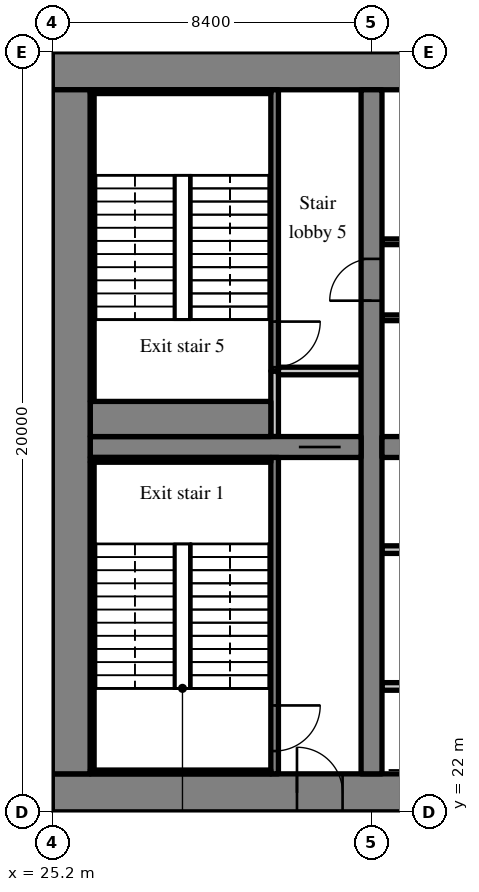
"""IFC4 building model, lengths in metres.
Left out: names, types, materials, properties, quantities, classifications, styles, units other than length and angle.
Written with IfcOpenShell. Run it as: python <this file> out.ifc"""

import sys

from ifc_helpers import new_model, si_unit, direction, frame, frame_2d, origin, place, context, subcontext, project, spatial, rectangle, extrude, source, transform, mapped, element, fill, save


model = new_model("IFC4")
c1 = context("Model", 3, precision=1e-05, world=origin(), true_north=direction((0.0, 1.0)))
c2 = subcontext(c1, "Body", "Model", "MODEL_VIEW")
j1 = project(units=[si_unit("LENGTHUNIT", "METRE"), si_unit("PLANEANGLEUNIT", "RADIAN")], contexts=[c1])
p1 = place(None, origin())
s1 = spatial("IfcSite", under=j1, at=p1, CompositionType="ELEMENT")
p2 = place(p1, origin())
s2 = spatial("IfcBuilding", under=s1, at=p2, CompositionType="ELEMENT")
p3 = place(p2, frame((0.0, 0.0, 65.8)))
s3 = spatial("IfcBuildingStorey", under=s2, at=p3, CompositionType="ELEMENT", Elevation=65.8)
m1 = source(origin(), c2, "Body", "SweptSolid", [
    extrude(rectangle(XDim=50.4, YDim=1.0, at=frame_2d((25.2, 0.0))), origin(), (0.0, 0.0, 1.0), 3.52),
])
p4 = place(p3, frame((25.2, 22.5, 0.0), z_axis=(0.0, 0.0, 1.0), x_axis=(1.0, 0.0, 0.0)))
e1 = element("IfcWall", 1, at=p4, inside=s3, PredefinedType="SHEAR", context=c2, shape_type="MappedRepresentation", body=[
    mapped(m1, transform((0.0, 0.0, 0.0), scale=1.0)),
])
m2 = source(origin(), c2, "Body", "SweptSolid", [
    extrude(rectangle(XDim=1.8, YDim=2.1, at=frame_2d((0.9, 1.05))), frame((0.0, 0.51, 0.0), z_axis=(0.0, -1.0, 0.0), x_axis=(1.0, 0.0, 0.0)), (0.0, 0.0, 1.0), 1.02),
])
p5 = place(p4, frame((15.9, 0.0, 0.0)))
e2 = element("IfcOpeningElement", 2, at=p5, cuts=e1, PredefinedType="OPENING", context=c2, shape_type="MappedRepresentation", body=[
    mapped(m2, transform((0.0, 0.0, 0.0), scale=1.0)),
])
m3 = source(origin(), c2, "Body", "SweptSolid", [
    extrude(rectangle(XDim=1.2, YDim=2.1, at=frame_2d((0.6, 1.05))), frame((0.0, 0.51, 0.0), z_axis=(0.0, -1.0, 0.0), x_axis=(1.0, 0.0, 0.0)), (0.0, 0.0, 1.0), 1.02),
])
p6 = place(p4, frame((26.987, 0.0, 0.0)))
e3 = element("IfcOpeningElement", 3, at=p6, cuts=e1, PredefinedType="OPENING", context=c2, shape_type="MappedRepresentation", body=[
    mapped(m3, transform((0.0, 0.0, 0.0), scale=1.0)),
])
m4 = source(origin(), c2, "Body", "SweptSolid", [
    extrude(rectangle(XDim=0.9, YDim=2.1, at=frame_2d((0.45, 1.05))), frame((0.0, 0.51, 0.0), z_axis=(0.0, -1.0, 0.0), x_axis=(1.0, 0.0, 0.0)), (0.0, 0.0, 1.0), 1.02),
])
p7 = place(p4, frame((34.5, 0.0, 0.0)))
e4 = element("IfcOpeningElement", 4, at=p7, cuts=e1, PredefinedType="OPENING", context=c2, shape_type="MappedRepresentation", body=[
    mapped(m4, transform((0.0, 0.0, 0.0), scale=1.0)),
])
p8 = place(p4, frame((31.5, 0.0, 0.0)))
e5 = element("IfcOpeningElement", 5, at=p8, cuts=e1, PredefinedType="OPENING", context=c2, shape_type="MappedRepresentation", body=[
    mapped(m4, transform((0.0, 0.0, 0.0), scale=1.0)),
])
p9 = place(p4, frame((39.769, 0.0, 0.0)))
e6 = element("IfcOpeningElement", 6, at=p9, cuts=e1, PredefinedType="OPENING", context=c2, shape_type="MappedRepresentation", body=[
    mapped(m4, transform((0.0, 0.0, 0.0), scale=1.0)),
])
p10 = place(p4, frame((36.756, 0.0, 0.0)))
e7 = element("IfcOpeningElement", 7, at=p10, cuts=e1, PredefinedType="OPENING", context=c2, shape_type="MappedRepresentation", body=[
    mapped(m4, transform((0.0, 0.0, 0.0), scale=1.0)),
])
p11 = place(p4, frame((6.438, 0.0, 0.0)))
e8 = element("IfcOpeningElement", 8, at=p11, cuts=e1, PredefinedType="OPENING", context=c2, shape_type="MappedRepresentation", body=[
    mapped(m3, transform((0.0, 0.0, 0.0), scale=1.0)),
])
p12 = place(p4, frame((47.725, 0.0, 0.0)))
e9 = element("IfcOpeningElement", 9, at=p12, cuts=e1, PredefinedType="OPENING", context=c2, shape_type="MappedRepresentation", body=[
    mapped(m3, transform((0.0, 0.0, 0.0), scale=1.0)),
])
p13 = place(p3, frame((25.2, 41.5, 0.0), z_axis=(0.0, 0.0, 1.0), x_axis=(1.0, 0.0, 0.0)))
e10 = element("IfcWall", 10, at=p13, inside=s3, PredefinedType="SHEAR", context=c2, shape_type="MappedRepresentation", body=[
    mapped(m1, transform((0.0, 0.0, 0.0), scale=1.0)),
])
m5 = source(origin(), c2, "Body", "SweptSolid", [
    extrude(rectangle(XDim=18.0, YDim=1.0, at=frame_2d((9.0, 0.0))), origin(), (0.0, 0.0, 1.0), 3.52),
])
p14 = place(p3, frame((25.7, 23.0, 0.0), z_axis=(0.0, 0.0, 1.0), x_axis=(0.0, 1.0, 0.0)))
e11 = element("IfcWall", 11, at=p14, inside=s3, PredefinedType="SHEAR", context=c2, shape_type="MappedRepresentation", body=[
    mapped(m5, transform((0.0, 0.0, 0.0), scale=1.0)),
])
m6 = source(origin(), c2, "Body", "SweptSolid", [
    extrude(rectangle(XDim=18.0, YDim=0.55, at=frame_2d((9.0, 0.0))), origin(), (0.0, 0.0, 1.0), 3.52),
])
p15 = place(p3, frame((33.6, 23.0, 0.0), z_axis=(0.0, 0.0, 1.0), x_axis=(0.0, 1.0, 0.0)))
e12 = element("IfcWall", 12, at=p15, inside=s3, PredefinedType="SHEAR", context=c2, shape_type="MappedRepresentation", body=[
    mapped(m6, transform((0.0, 0.0, 0.0), scale=1.0)),
])
m7 = source(origin(), c2, "Body", "SweptSolid", [
    extrude(rectangle(XDim=1.1, YDim=2.1, at=frame_2d((0.55, 1.05))), frame((0.0, 0.285, 0.0), z_axis=(0.0, -1.0, 0.0), x_axis=(1.0, 0.0, 0.0)), (0.0, 0.0, 1.0), 0.57),
])
p16 = place(p15, frame((12.45, 0.0, 0.0)))
e13 = element("IfcOpeningElement", 13, at=p16, cuts=e12, PredefinedType="OPENING", context=c2, shape_type="MappedRepresentation", body=[
    mapped(m7, transform((0.0, 0.0, 0.0), scale=1.0)),
])
m8 = source(origin(), c2, "Body", "SweptSolid", [
    extrude(rectangle(XDim=7.125, YDim=0.55, at=frame_2d((3.562, 0.0))), origin(), (0.0, 0.0, 1.0), 3.52),
])
p17 = place(p3, frame((26.2, 31.6, 0.0), z_axis=(0.0, 0.0, 1.0), x_axis=(1.0, 0.0, 0.0)))
e14 = element("IfcWall", 14, at=p17, inside=s3, PredefinedType="SHEAR", context=c2, shape_type="MappedRepresentation", body=[
    mapped(m8, transform((0.0, 0.0, 0.0), scale=1.0)),
])
p18 = place(p17, frame((5.488, 0.0, 0.0)))
e15 = element("IfcOpeningElement", 15, at=p18, cuts=e14, PredefinedType="OPENING", context=c2, shape_type="MappedRepresentation", body=[
    mapped(m7, transform((0.0, 0.0, 0.0), scale=1.0)),
])
m9 = source(origin(), c2, "Body", "SweptSolid", [
    extrude(rectangle(XDim=16.25, YDim=0.55, at=frame_2d((8.125, 0.0))), origin(), (0.0, 0.0, 1.0), 3.52),
])
p19 = place(p3, frame((33.875, 31.6, 0.0), z_axis=(0.0, 0.0, 1.0), x_axis=(1.0, 0.0, 0.0)))
e16 = element("IfcWall", 16, at=p19, inside=s3, PredefinedType="SHEAR", context=c2, shape_type="MappedRepresentation", body=[
    mapped(m9, transform((0.0, 0.0, 0.0), scale=1.0)),
])
m10 = source(origin(), c2, "Body", "SweptSolid", [
    extrude(rectangle(XDim=1.0, YDim=2.1, at=frame_2d((0.5, 1.05))), frame((0.0, 0.285, 0.0), z_axis=(0.0, -1.0, 0.0), x_axis=(1.0, 0.0, 0.0)), (0.0, 0.0, 1.0), 0.57),
])
p20 = place(p19, frame((14.687, 0.0, 0.0)))
e17 = element("IfcOpeningElement", 17, at=p20, cuts=e16, PredefinedType="OPENING", context=c2, shape_type="MappedRepresentation", body=[
    mapped(m10, transform((0.0, 0.0, 0.0), scale=1.0)),
])
m11 = source(origin(), c2, "Body", "SweptSolid", [
    extrude(rectangle(XDim=3.559, YDim=0.3, at=frame_2d((1.78, 0.0))), origin(), (0.0, 0.0, 1.0), 3.52),
])
p21 = place(p3, frame((25.55, 39.969, 0.0), z_axis=(0.0, 0.0, 1.0), x_axis=(-0.35779745313, 0.933799219604, 0.0)))
e18 = element("IfcWall", 18, at=p21, inside=s3, PredefinedType="SOLIDWALL", context=c2, shape_type="MappedRepresentation", body=[
    mapped(m11, transform((0.0, 0.0, 0.0), scale=1.0)),
])
m12 = source(origin(), c2, "Body", "SweptSolid", [
    extrude(rectangle(XDim=1.5, YDim=2.0, at=frame_2d((0.75, 1.0))), frame((0.0, 0.16, 0.0), z_axis=(0.0, -1.0, 0.0), x_axis=(1.0, 0.0, 0.0)), (0.0, 0.0, 1.0), 0.32),
])
p22 = place(p21, frame((1.903, 0.0, 0.9)))
e19 = element("IfcOpeningElement", 19, at=p22, cuts=e18, PredefinedType="OPENING", context=c2, shape_type="MappedRepresentation", body=[
    mapped(m12, transform((0.0, 0.0, 0.0), scale=1.0)),
])
m13 = source(origin(), c2, "Body", "SweptSolid", [
    extrude(rectangle(XDim=6.025, YDim=0.2, at=frame_2d((3.012, 0.0))), origin(), (0.0, 0.0, 1.0), 3.52),
])
p23 = place(p3, frame((33.875, 25.3, 0.0), z_axis=(0.0, 0.0, 1.0), x_axis=(1.0, 0.0, 0.0)))
e20 = element("IfcWall", 20, at=p23, inside=s3, PredefinedType="SOLIDWALL", context=c2, shape_type="MappedRepresentation", body=[
    mapped(m13, transform((0.0, 0.0, 0.0), scale=1.0)),
])
m14 = source(origin(), c2, "Body", "SweptSolid", [
    extrude(rectangle(XDim=1.1, YDim=2.1, at=frame_2d((0.55, 1.05))), frame((0.0, 0.11, 0.0), z_axis=(0.0, -1.0, 0.0), x_axis=(1.0, 0.0, 0.0)), (0.0, 0.0, 1.0), 0.22),
])
p24 = place(p23, frame((0.975, 0.0, 0.0)))
e21 = element("IfcOpeningElement", 21, at=p24, cuts=e20, PredefinedType="OPENING", context=c2, shape_type="MappedRepresentation", body=[
    mapped(m14, transform((0.0, 0.0, 0.0), scale=1.0)),
])
p25 = place(p23, frame((3.975, 0.0, 0.0)))
e22 = element("IfcOpeningElement", 22, at=p25, cuts=e20, PredefinedType="OPENING", context=c2, shape_type="MappedRepresentation", body=[
    mapped(m14, transform((0.0, 0.0, 0.0), scale=1.0)),
])
m15 = source(origin(), c2, "Body", "SweptSolid", [
    extrude(rectangle(XDim=12.025, YDim=0.2, at=frame_2d((6.012, 0.0))), origin(), (0.0, 0.0, 1.0), 3.52),
])
p26 = place(p3, frame((33.875, 28.9, 0.0), z_axis=(0.0, 0.0, 1.0), x_axis=(1.0, 0.0, 0.0)))
e23 = element("IfcWall", 23, at=p26, inside=s3, PredefinedType="SOLIDWALL", context=c2, shape_type="MappedRepresentation", body=[
    mapped(m15, transform((0.0, 0.0, 0.0), scale=1.0)),
])
p27 = place(p26, frame((0.975, 0.0, 0.0)))
e24 = element("IfcOpeningElement", 24, at=p27, cuts=e23, PredefinedType="OPENING", context=c2, shape_type="MappedRepresentation", body=[
    mapped(m14, transform((0.0, 0.0, 0.0), scale=1.0)),
])
p28 = place(p26, frame((3.975, 0.0, 0.0)))
e25 = element("IfcOpeningElement", 25, at=p28, cuts=e23, PredefinedType="OPENING", context=c2, shape_type="MappedRepresentation", body=[
    mapped(m14, transform((0.0, 0.0, 0.0), scale=1.0)),
])
p29 = place(p26, frame((6.975, 0.0, 0.0)))
e26 = element("IfcOpeningElement", 26, at=p29, cuts=e23, PredefinedType="OPENING", context=c2, shape_type="MappedRepresentation", body=[
    mapped(m14, transform((0.0, 0.0, 0.0), scale=1.0)),
])
p30 = place(p26, frame((9.975, 0.0, 0.0)))
e27 = element("IfcOpeningElement", 27, at=p30, cuts=e23, PredefinedType="OPENING", context=c2, shape_type="MappedRepresentation", body=[
    mapped(m14, transform((0.0, 0.0, 0.0), scale=1.0)),
])
m16 = source(origin(), c2, "Body", "SweptSolid", [
    extrude(rectangle(XDim=14.125, YDim=0.15, at=frame_2d((7.062, 0.0))), origin(), (0.0, 0.0, 1.0), 3.52),
])
p31 = place(p3, frame((33.875, 35.0, 0.0), z_axis=(0.0, 0.0, 1.0), x_axis=(1.0, 0.0, 0.0)))
e28 = element("IfcWall", 28, at=p31, inside=s3, PredefinedType="PARTITIONING", context=c2, shape_type="MappedRepresentation", body=[
    mapped(m16, transform((0.0, 0.0, 0.0), scale=1.0)),
])
m17 = source(origin(), c2, "Body", "SweptSolid", [
    extrude(rectangle(XDim=0.9, YDim=2.1, at=frame_2d((0.45, 1.05))), frame((0.0, 0.085, 0.0), z_axis=(0.0, -1.0, 0.0), x_axis=(1.0, 0.0, 0.0)), (0.0, 0.0, 1.0), 0.17),
])
p32 = place(p31, frame((2.009, 0.0, 0.0)))
e29 = element("IfcOpeningElement", 29, at=p32, cuts=e28, PredefinedType="OPENING", context=c2, shape_type="MappedRepresentation", body=[
    mapped(m17, transform((0.0, 0.0, 0.0), scale=1.0)),
])
p33 = place(p31, frame((9.034, 0.0, 0.0)))
e30 = element("IfcOpeningElement", 30, at=p33, cuts=e28, PredefinedType="OPENING", context=c2, shape_type="MappedRepresentation", body=[
    mapped(m17, transform((0.0, 0.0, 0.0), scale=1.0)),
])
m18 = source(origin(), c2, "Body", "SweptSolid", [
    extrude(rectangle(XDim=16.25, YDim=0.15, at=frame_2d((8.125, 0.0))), origin(), (0.0, 0.0, 1.0), 3.52),
])
p34 = place(p3, frame((33.875, 37.0, 0.0), z_axis=(0.0, 0.0, 1.0), x_axis=(1.0, 0.0, 0.0)))
e31 = element("IfcWall", 31, at=p34, inside=s3, PredefinedType="PARTITIONING", context=c2, shape_type="MappedRepresentation", body=[
    mapped(m18, transform((0.0, 0.0, 0.0), scale=1.0)),
])
p35 = place(p34, frame((3.206, 0.0, 0.0)))
e32 = element("IfcOpeningElement", 32, at=p35, cuts=e31, PredefinedType="OPENING", context=c2, shape_type="MappedRepresentation", body=[
    mapped(m17, transform((0.0, 0.0, 0.0), scale=1.0)),
])
p36 = place(p34, frame((8.081, 0.0, 0.0)))
e33 = element("IfcOpeningElement", 33, at=p36, cuts=e31, PredefinedType="OPENING", context=c2, shape_type="MappedRepresentation", body=[
    mapped(m17, transform((0.0, 0.0, 0.0), scale=1.0)),
])
p37 = place(p34, frame((11.331, 0.0, 0.0)))
e34 = element("IfcOpeningElement", 34, at=p37, cuts=e31, PredefinedType="OPENING", context=c2, shape_type="MappedRepresentation", body=[
    mapped(m17, transform((0.0, 0.0, 0.0), scale=1.0)),
])
p38 = place(p34, frame((14.581, 0.0, 0.0)))
e35 = element("IfcOpeningElement", 35, at=p38, cuts=e31, PredefinedType="OPENING", context=c2, shape_type="MappedRepresentation", body=[
    mapped(m17, transform((0.0, 0.0, 0.0), scale=1.0)),
])
m19 = source(origin(), c2, "Body", "SweptSolid", [
    extrude(rectangle(XDim=8.325, YDim=0.2, at=frame_2d((4.163, 0.0))), origin(), (0.0, 0.0, 1.0), 3.52),
])
p39 = place(p3, frame((31.05, 23.0, 0.0), z_axis=(0.0, 0.0, 1.0), x_axis=(0.0, 1.0, 0.0)))
e36 = element("IfcWall", 36, at=p39, inside=s3, PredefinedType="SOLIDWALL", context=c2, shape_type="MappedRepresentation", body=[
    mapped(m19, transform((0.0, 0.0, 0.0), scale=1.0)),
])
m20 = source(origin(), c2, "Body", "SweptSolid", [
    extrude(rectangle(XDim=1.2, YDim=2.1, at=frame_2d((0.6, 1.05))), frame((0.0, 0.11, 0.0), z_axis=(0.0, -1.0, 0.0), x_axis=(1.0, 0.0, 0.0)), (0.0, 0.0, 1.0), 0.22),
])
p40 = place(p39, frame((0.6, 0.0, 0.0)))
e37 = element("IfcOpeningElement", 37, at=p40, cuts=e36, PredefinedType="OPENING", context=c2, shape_type="MappedRepresentation", body=[
    mapped(m20, transform((0.0, 0.0, 0.0), scale=1.0)),
])
m21 = source(origin(), c2, "Body", "SweptSolid", [
    extrude(rectangle(XDim=1.725, YDim=0.2, at=frame_2d((0.863, 0.0))), origin(), (0.0, 0.0, 1.0), 3.52),
])
p41 = place(p3, frame((31.05, 31.875, 0.0), z_axis=(0.0, 0.0, 1.0), x_axis=(0.0, 1.0, 0.0)))
e38 = element("IfcWall", 38, at=p41, inside=s3, PredefinedType="SOLIDWALL", context=c2, shape_type="MappedRepresentation", body=[
    mapped(m21, transform((0.0, 0.0, 0.0), scale=1.0)),
])
m22 = source(origin(), c2, "Body", "SweptSolid", [
    extrude(rectangle(XDim=2.175, YDim=0.2, at=frame_2d((1.087, 0.0))), origin(), (0.0, 0.0, 1.0), 3.52),
])
p42 = place(p3, frame((31.15, 33.6, 0.0), z_axis=(0.0, 0.0, 1.0), x_axis=(1.0, 0.0, 0.0)))
e39 = element("IfcWall", 39, at=p42, inside=s3, PredefinedType="SOLIDWALL", context=c2, shape_type="MappedRepresentation", body=[
    mapped(m22, transform((0.0, 0.0, 0.0), scale=1.0)),
])
m23 = source(origin(), c2, "Body", "SweptSolid", [
    extrude(rectangle(XDim=7.4, YDim=0.2, at=frame_2d((3.7, 0.0))), origin(), (0.0, 0.0, 1.0), 3.52),
])
p43 = place(p3, frame((31.05, 33.6, 0.0), z_axis=(0.0, 0.0, 1.0), x_axis=(0.0, 1.0, 0.0)))
e40 = element("IfcWall", 40, at=p43, inside=s3, PredefinedType="SOLIDWALL", context=c2, shape_type="MappedRepresentation", body=[
    mapped(m23, transform((0.0, 0.0, 0.0), scale=1.0)),
])
p44 = place(p43, frame((0.1, 0.0, 0.0)))
e41 = element("IfcOpeningElement", 41, at=p44, cuts=e40, PredefinedType="OPENING", context=c2, shape_type="MappedRepresentation", body=[
    mapped(m20, transform((0.0, 0.0, 0.0), scale=1.0)),
])
m24 = source(origin(), c2, "Body", "SweptSolid", [
    extrude(rectangle(XDim=8.2, YDim=0.2, at=frame_2d((4.1, 0.0))), origin(), (0.0, 0.0, 1.0), 3.52),
])
p45 = place(p3, frame((17.0, 22.1, 0.0), z_axis=(0.0, 0.0, 1.0), x_axis=(1.0, 0.0, 0.0)))
e42 = element("IfcWall", 42, at=p45, inside=s3, PredefinedType="SOLIDWALL", context=c2, shape_type="MappedRepresentation", body=[
    mapped(m24, transform((0.0, 0.0, 0.0), scale=1.0)),
])
p46 = place(p45, frame((6.0, 0.0, 0.0)))
e43 = element("IfcOpeningElement", 43, at=p46, cuts=e42, PredefinedType="OPENING", context=c2, shape_type="MappedRepresentation", body=[
    mapped(m20, transform((0.0, 0.0, 0.0), scale=1.0)),
])
p47 = place(p3, frame((17.0, 30.4, 0.0), z_axis=(0.0, 0.0, 1.0), x_axis=(1.0, 0.0, 0.0)))
e44 = element("IfcWall", 44, at=p47, inside=s3, PredefinedType="SOLIDWALL", context=c2, shape_type="MappedRepresentation", body=[
    mapped(m24, transform((0.0, 0.0, 0.0), scale=1.0)),
])
m25 = source(origin(), c2, "Body", "SweptSolid", [
    extrude(rectangle(XDim=1.0, YDim=2.1, at=frame_2d((0.5, 1.05))), frame((0.0, 0.11, 0.0), z_axis=(0.0, -1.0, 0.0), x_axis=(1.0, 0.0, 0.0)), (0.0, 0.0, 1.0), 0.22),
])
p48 = place(p47, frame((6.1, 0.0, 0.0)))
e45 = element("IfcOpeningElement", 45, at=p48, cuts=e44, PredefinedType="OPENING", context=c2, shape_type="MappedRepresentation", body=[
    mapped(m25, transform((0.0, 0.0, 0.0), scale=1.0)),
])
m26 = source(origin(), c2, "Body", "SweptSolid", [
    extrude(rectangle(XDim=4.75, YDim=0.1, at=frame_2d((2.375, 0.0))), origin(), (0.0, 0.0, 1.0), 3.52),
])
p49 = place(p3, frame((26.2, 23.05, 0.0), z_axis=(0.0, 0.0, 1.0), x_axis=(1.0, 0.0, 0.0)))
e46 = element("IfcWall", 46, at=p49, inside=s3, PredefinedType="SOLIDWALL", context=c2, shape_type="MappedRepresentation", body=[
    mapped(m26, transform((0.0, 0.0, 0.0), scale=1.0)),
])
m27 = source(origin(), c2, "Body", "SweptSolid", [
    extrude(rectangle(XDim=4.75, YDim=0.125, at=frame_2d((2.375, 0.0))), origin(), (0.0, 0.0, 1.0), 3.52),
])
p50 = place(p3, frame((26.2, 31.262, 0.0), z_axis=(0.0, 0.0, 1.0), x_axis=(1.0, 0.0, 0.0)))
e47 = element("IfcWall", 47, at=p50, inside=s3, PredefinedType="SOLIDWALL", context=c2, shape_type="MappedRepresentation", body=[
    mapped(m27, transform((0.0, 0.0, 0.0), scale=1.0)),
])
m28 = source(origin(), c2, "Body", "SweptSolid", [
    extrude(rectangle(XDim=8.1, YDim=0.1, at=frame_2d((4.05, 0.0))), origin(), (0.0, 0.0, 1.0), 3.52),
])
p51 = place(p3, frame((26.25, 23.1, 0.0), z_axis=(0.0, 0.0, 1.0), x_axis=(0.0, 1.0, 0.0)))
e48 = element("IfcWall", 48, at=p51, inside=s3, PredefinedType="SOLIDWALL", context=c2, shape_type="MappedRepresentation", body=[
    mapped(m28, transform((0.0, 0.0, 0.0), scale=1.0)),
])
p52 = place(p3, frame((26.2, 40.95, 0.0), z_axis=(0.0, 0.0, 1.0), x_axis=(1.0, 0.0, 0.0)))
e49 = element("IfcWall", 49, at=p52, inside=s3, PredefinedType="SOLIDWALL", context=c2, shape_type="MappedRepresentation", body=[
    mapped(m26, transform((0.0, 0.0, 0.0), scale=1.0)),
])
m29 = source(origin(), c2, "Body", "SweptSolid", [
    extrude(rectangle(XDim=4.75, YDim=0.925, at=frame_2d((2.375, 0.0))), origin(), (0.0, 0.0, 1.0), 3.52),
])
p53 = place(p3, frame((26.2, 32.337, 0.0), z_axis=(0.0, 0.0, 1.0), x_axis=(1.0, 0.0, 0.0)))
e50 = element("IfcWall", 50, at=p53, inside=s3, PredefinedType="SOLIDWALL", context=c2, shape_type="MappedRepresentation", body=[
    mapped(m29, transform((0.0, 0.0, 0.0), scale=1.0)),
])
p54 = place(p3, frame((26.25, 32.8, 0.0), z_axis=(0.0, 0.0, 1.0), x_axis=(0.0, 1.0, 0.0)))
e51 = element("IfcWall", 51, at=p54, inside=s3, PredefinedType="SOLIDWALL", context=c2, shape_type="MappedRepresentation", body=[
    mapped(m28, transform((0.0, 0.0, 0.0), scale=1.0)),
])
m30 = source(origin(), c2, "Body", "SweptSolid", [
    extrude(rectangle(XDim=1.2, YDim=2.1, at=frame_2d((0.6, 1.05))), frame((0.0, 0.025, 0.0), z_axis=(0.0, -1.0, 0.0), x_axis=(1.0, 0.0, 0.0)), (0.0, 0.0, 1.0), 0.05),
])
p55 = place(p40, origin())
e52 = element("IfcDoor", 52, at=p55, inside=s3, OperationType="SINGLE_SWING_RIGHT", PredefinedType="DOOR", context=c2, shape_type="MappedRepresentation", body=[
    mapped(m30, transform((0.0, 0.0, 0.0), scale=1.0)),
])
fill(e37, e52)
m31 = source(origin(), c2, "Body", "SweptSolid", [
    extrude(rectangle(XDim=1.2, YDim=2.1, at=frame_2d((0.6, 1.05))), frame((0.0, 0.375, 0.0), z_axis=(0.0, -1.0, 0.0), x_axis=(1.0, 0.0, 0.0)), (0.0, 0.0, 1.0), 0.05),
])
p56 = place(p11, origin())
e53 = element("IfcDoor", 53, at=p56, inside=s3, OperationType="SINGLE_SWING_LEFT", PredefinedType="DOOR", context=c2, shape_type="MappedRepresentation", body=[
    mapped(m31, transform((0.0, 0.0, 0.0), scale=1.0)),
])
fill(e8, e53)
m32 = source(origin(), c2, "Body", "SweptSolid", [
    extrude(rectangle(XDim=1.1, YDim=2.1, at=frame_2d((0.55, 1.05))), frame((0.0, 0.025, 0.0), z_axis=(0.0, -1.0, 0.0), x_axis=(1.0, 0.0, 0.0)), (0.0, 0.0, 1.0), 0.05),
])
p57 = place(p18, origin())
e54 = element("IfcDoor", 54, at=p57, inside=s3, OperationType="SLIDING_TO_RIGHT", PredefinedType="DOOR", context=c2, shape_type="MappedRepresentation", body=[
    mapped(m32, transform((0.0, 0.0, 0.0), scale=1.0)),
])
fill(e15, e54)
p58 = place(p44, origin())
e55 = element("IfcDoor", 55, at=p58, inside=s3, OperationType="SINGLE_SWING_RIGHT", PredefinedType="DOOR", context=c2, shape_type="MappedRepresentation", body=[
    mapped(m30, transform((0.0, 0.0, 0.0), scale=1.0)),
])
fill(e41, e55)
p59 = place(p16, origin())
e56 = element("IfcDoor", 56, at=p59, inside=s3, OperationType="SINGLE_SWING_LEFT", PredefinedType="DOOR", context=c2, shape_type="MappedRepresentation", body=[
    mapped(m32, transform((0.0, 0.0, 0.0), scale=1.0)),
])
fill(e13, e56)
save(model, sys.argv[1])
